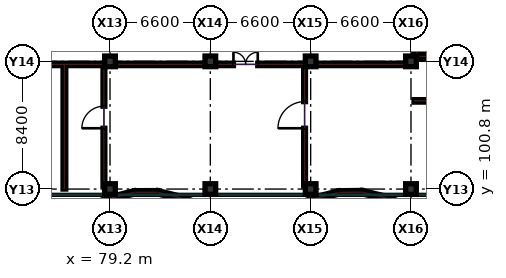
"""IFC4 building model, lengths in metres.
Left out: names, types, materials, properties, quantities, classifications, styles, units other than length and angle.
Written with IfcOpenShell. Run it as: python <this file> out.ifc"""

import sys

from ifc_helpers import new_model, si_unit, direction, frame, frame_2d, origin, origin_2d, place, context, subcontext, project, spatial, rectangle, extrude, element, fill, save


model = new_model("IFC4")
c1 = context("Model", 3, precision=1e-05, world=origin(), true_north=direction((0.0, 1.0)))
c2 = subcontext(c1, "Body", "Model", "MODEL_VIEW")
j1 = project(units=[si_unit("LENGTHUNIT", "METRE"), si_unit("PLANEANGLEUNIT", "RADIAN")], contexts=[c1])
p1 = place(None, origin())
s1 = spatial("IfcSite", under=j1, at=p1, CompositionType="ELEMENT")
p2 = place(p1, origin())
s2 = spatial("IfcBuilding", under=s1, at=p2, CompositionType="ELEMENT")
p3 = place(p2, frame((0.0, 0.0, 5.4)))
s3 = spatial("IfcBuildingStorey", under=s2, at=p3, CompositionType="ELEMENT", Elevation=5.4)
for number, where, z_axis, x_axis in (
    (1, (79.2, 100.8, 0.0), (0.0, 0.0, 1.0), (1.0, 0.0, 0.0)),
    (2, (79.2, 109.2, 0.0), (0.0, 0.0, 1.0), (1.0, 0.0, 0.0)),
    (3, (85.8, 100.8, 0.0), (0.0, 0.0, 1.0), (1.0, 0.0, 0.0)),
    (4, (85.8, 109.2, 0.0), (0.0, 0.0, 1.0), (1.0, 0.0, 0.0)),
    (5, (92.4, 100.8, 0.0), (0.0, 0.0, 1.0), (1.0, 0.0, 0.0)),
    (6, (92.4, 109.2, 0.0), (0.0, 0.0, 1.0), (1.0, 0.0, 0.0)),
    (7, (99.0, 100.8, 0.0), (0.0, 0.0, 1.0), (1.0, 0.0, 0.0)),
    (8, (99.0, 109.2, 0.0), (0.0, 0.0, 1.0), (1.0, 0.0, 0.0)),
):
    element("IfcColumn", number, at=place(p3, frame(where, z_axis=z_axis, x_axis=x_axis)), inside=s3, PredefinedType="COLUMN", context=c2, shape_type="SweptSolid", body=[
        extrude(rectangle(XDim=0.7, YDim=0.7, at=origin_2d()), origin(), (0.0, 0.0, 1.0), 4.5),
    ])
p4 = place(p3, frame((73.05, 109.0, 0.0), z_axis=(0.0, 0.0, 1.0), x_axis=(1.0, 0.0, 0.0)))
e9 = element("IfcWall", 9, at=p4, inside=s3, PredefinedType="PARTITIONING", context=c2, shape_type="SweptSolid", body=[
    extrude(rectangle(XDim=5.7, YDim=0.16, at=frame_2d((2.85, 0.0))), origin(), (0.0, 0.0, 1.0), 3.435),
])
p5 = place(p3, frame((79.65, 109.0, 0.0), z_axis=(0.0, 0.0, 1.0), x_axis=(1.0, 0.0, 0.0)))
e10 = element("IfcWall", 10, at=p5, inside=s3, PredefinedType="PARTITIONING", context=c2, shape_type="SweptSolid", body=[
    extrude(rectangle(XDim=5.7, YDim=0.16, at=frame_2d((2.85, 0.0))), origin(), (0.0, 0.0, 1.0), 3.435),
])
p6 = place(p3, frame((86.25, 109.0, 0.0), z_axis=(0.0, 0.0, 1.0), x_axis=(1.0, 0.0, 0.0)))
e11 = element("IfcWall", 11, at=p6, inside=s3, PredefinedType="PARTITIONING", context=c2, shape_type="SweptSolid", body=[
    extrude(rectangle(XDim=5.7, YDim=0.16, at=frame_2d((2.85, 0.0))), origin(), (0.0, 0.0, 1.0), 3.435),
])
p7 = place(p6, frame((1.07, 0.0, 0.0)))
e12 = element("IfcOpeningElement", 12, at=p7, cuts=e11, PredefinedType="OPENING", context=c2, shape_type="SweptSolid", body=[
    extrude(rectangle(XDim=1.6, YDim=2.2, at=frame_2d((0.8, 1.1))), frame((0.0, 0.09, 0.0), z_axis=(0.0, -1.0, 0.0), x_axis=(1.0, 0.0, 0.0)), (0.0, 0.0, 1.0), 0.18),
])
p8 = place(p3, frame((92.85, 109.0, 0.0), z_axis=(0.0, 0.0, 1.0), x_axis=(1.0, 0.0, 0.0)))
e13 = element("IfcWall", 13, at=p8, inside=s3, PredefinedType="PARTITIONING", context=c2, shape_type="SweptSolid", body=[
    extrude(rectangle(XDim=6.45, YDim=0.16, at=frame_2d((3.225, 0.0))), origin(), (0.0, 0.0, 1.0), 3.435),
])
p9 = place(p3, frame((76.2, 100.8, 0.0), z_axis=(0.0, 0.0, 1.0), x_axis=(0.0, 1.0, 0.0)))
e14 = element("IfcWall", 14, at=p9, inside=s3, PredefinedType="SOLIDWALL", context=c2, shape_type="SweptSolid", body=[
    extrude(rectangle(XDim=8.2, YDim=0.18, at=frame_2d((4.1, 0.0))), origin(), (0.0, 0.0, 1.0), 3.45),
])
p10 = place(p3, frame((78.8, 101.0, 0.0), z_axis=(0.0, 0.0, 1.0), x_axis=(0.0, 1.0, 0.0)))
e15 = element("IfcWall", 15, at=p10, inside=s3, PredefinedType="PARTITIONING", context=c2, shape_type="SweptSolid", body=[
    extrude(rectangle(XDim=8.0, YDim=0.12, at=frame_2d((4.0, 0.0))), origin(), (0.0, 0.0, 1.0), 3.45),
])
p11 = place(p10, frame((3.8, 0.0, 0.0)))
e16 = element("IfcOpeningElement", 16, at=p11, cuts=e15, PredefinedType="OPENING", context=c2, shape_type="SweptSolid", body=[
    extrude(rectangle(XDim=1.45, YDim=2.25, at=frame_2d((0.725, 1.125))), frame((0.0, 0.07, 0.0), z_axis=(0.0, -1.0, 0.0), x_axis=(1.0, 0.0, 0.0)), (0.0, 0.0, 1.0), 0.14),
])
p12 = place(p3, frame((92.0, 101.0, 0.0), z_axis=(0.0, 0.0, 1.0), x_axis=(0.0, 1.0, 0.0)))
e17 = element("IfcWall", 17, at=p12, inside=s3, PredefinedType="PARTITIONING", context=c2, shape_type="SweptSolid", body=[
    extrude(rectangle(XDim=8.0, YDim=0.12, at=frame_2d((4.0, 0.0))), origin(), (0.0, 0.0, 1.0), 3.45),
])
p13 = place(p12, frame((3.8, 0.0, 0.0)))
e18 = element("IfcOpeningElement", 18, at=p13, cuts=e17, PredefinedType="OPENING", context=c2, shape_type="SweptSolid", body=[
    extrude(rectangle(XDim=1.75, YDim=2.3, at=frame_2d((0.875, 1.15))), frame((0.0, 0.07, 0.0), z_axis=(0.0, -1.0, 0.0), x_axis=(1.0, 0.0, 0.0)), (0.0, 0.0, 1.0), 0.14),
])
p14 = place(p3, frame((99.2, 106.6, 0.0), z_axis=(0.0, 0.0, 1.0), x_axis=(1.0, 0.0, 0.0)))
e19 = element("IfcWall", 19, at=p14, inside=s3, PredefinedType="PARTITIONING", context=c2, shape_type="SweptSolid", body=[
    extrude(rectangle(XDim=12.9, YDim=0.16, at=frame_2d((6.45, 0.0))), origin(), (0.0, 0.0, 1.0), 3.45),
])
p15 = place(p14, frame((4.2, 0.0, 0.0)))
e20 = element("IfcOpeningElement", 20, at=p15, cuts=e19, PredefinedType="OPENING", context=c2, shape_type="SweptSolid", body=[
    extrude(rectangle(XDim=1.05, YDim=2.15, at=frame_2d((0.525, 1.075))), frame((0.0, 0.09, 0.0), z_axis=(0.0, -1.0, 0.0), x_axis=(1.0, 0.0, 0.0)), (0.0, 0.0, 1.0), 0.18),
])
p16 = place(p3, frame((77.78, 99.63, 0.0), z_axis=(0.0, 0.0, 1.0), x_axis=(0.93436439089, 0.356318937241, 0.0)))
e21 = element("IfcWall", 21, at=p16, inside=s3, PredefinedType="SOLIDWALL", context=c2, shape_type="SweptSolid", body=[
    extrude(rectangle(XDim=1.6, YDim=0.22, at=frame_2d((0.8, 0.0))), origin(), (0.0, 0.0, 1.0), 1.45),
])
p17 = place(p3, frame((79.29, 100.205, 0.0), z_axis=(0.0, 0.0, 1.0), x_axis=(0.969946501023, 0.243318279531, 0.0)))
e22 = element("IfcWall", 22, at=p17, inside=s3, PredefinedType="SOLIDWALL", context=c2, shape_type="SweptSolid", body=[
    extrude(rectangle(XDim=1.541, YDim=0.22, at=frame_2d((0.771, 0.0))), origin(), (0.0, 0.0, 1.0), 1.45),
])
p18 = place(p3, frame((80.82, 100.585, 0.0), z_axis=(0.0, 0.0, 1.0), x_axis=(0.999994118661, 0.003429671157, 0.0)))
e23 = element("IfcWall", 23, at=p18, inside=s3, PredefinedType="SOLIDWALL", context=c2, shape_type="SweptSolid", body=[
    extrude(rectangle(XDim=1.495, YDim=0.22, at=frame_2d((0.748, 0.0))), origin(), (0.0, 0.0, 1.0), 1.45),
])
p19 = place(p3, frame((82.35, 100.585, 0.0), z_axis=(0.0, 0.0, 1.0), x_axis=(0.971462405428, -0.237193580943, 0.0)))
e24 = element("IfcWall", 24, at=p19, inside=s3, PredefinedType="SOLIDWALL", context=c2, shape_type="SweptSolid", body=[
    extrude(rectangle(XDim=1.539, YDim=0.22, at=frame_2d((0.77, 0.0))), origin(), (0.0, 0.0, 1.0), 1.45),
])
p20 = place(p3, frame((83.86, 100.215, 0.0), z_axis=(0.0, 0.0, 1.0), x_axis=(0.933975237915, -0.35733773235, 0.0)))
e25 = element("IfcWall", 25, at=p20, inside=s3, PredefinedType="SOLIDWALL", context=c2, shape_type="SweptSolid", body=[
    extrude(rectangle(XDim=1.595, YDim=0.22, at=frame_2d((0.798, 0.0))), origin(), (0.0, 0.0, 1.0), 1.45),
])
p21 = place(p3, frame((91.23, 99.61, 0.0), z_axis=(0.0, 0.0, 1.0), x_axis=(0.933365245405, 0.358928013215, 0.0)))
e26 = element("IfcWall", 26, at=p21, inside=s3, PredefinedType="SOLIDWALL", context=c2, shape_type="SweptSolid", body=[
    extrude(rectangle(XDim=1.602, YDim=0.22, at=frame_2d((0.801, 0.0))), origin(), (0.0, 0.0, 1.0), 1.45),
])
p22 = place(p3, frame((92.74, 100.19, 0.0), z_axis=(0.0, 0.0, 1.0), x_axis=(0.968406785453, 0.249375816567, 0.0)))
e27 = element("IfcWall", 27, at=p22, inside=s3, PredefinedType="SOLIDWALL", context=c2, shape_type="SweptSolid", body=[
    extrude(rectangle(XDim=1.544, YDim=0.22, at=frame_2d((0.772, 0.0))), origin(), (0.0, 0.0, 1.0), 1.45),
])
p23 = place(p3, frame((94.27, 100.58, 0.0), z_axis=(0.0, 0.0, 1.0), x_axis=(0.999909748969, 0.01343480246, 0.0)))
e28 = element("IfcWall", 28, at=p23, inside=s3, PredefinedType="SOLIDWALL", context=c2, shape_type="SweptSolid", body=[
    extrude(rectangle(XDim=1.49, YDim=0.22, at=frame_2d((0.745, 0.0))), origin(), (0.0, 0.0, 1.0), 1.45),
])
p24 = place(p3, frame((95.795, 100.595, 0.0), z_axis=(0.0, 0.0, 1.0), x_axis=(0.972234340088, -0.234009375782, 0.0)))
e29 = element("IfcWall", 29, at=p24, inside=s3, PredefinedType="SOLIDWALL", context=c2, shape_type="SweptSolid", body=[
    extrude(rectangle(XDim=1.538, YDim=0.22, at=frame_2d((0.769, 0.0))), origin(), (0.0, 0.0, 1.0), 1.45),
])
p25 = place(p3, frame((97.305, 100.23, 0.0), z_axis=(0.0, 0.0, 1.0), x_axis=(0.935447403013, -0.353465919427, 0.0)))
e30 = element("IfcWall", 30, at=p25, inside=s3, PredefinedType="SOLIDWALL", context=c2, shape_type="SweptSolid", body=[
    extrude(rectangle(XDim=1.598, YDim=0.22, at=frame_2d((0.799, 0.0))), origin(), (0.0, 0.0, 1.0), 1.45),
])
p26 = place(p3, frame((99.37, 109.34, 0.0), z_axis=(0.0, 0.0, 1.0), x_axis=(0.0, 1.0, 0.0)))
e31 = element("IfcWall", 31, at=p26, inside=s3, PredefinedType="SHEAR", context=c2, shape_type="SweptSolid", body=[
    extrude(rectangle(XDim=8.09, YDim=0.36, at=frame_2d((4.045, 0.0))), origin(), (0.0, 0.0, 1.0), 4.2),
])
p27 = place(p3, frame((99.55, 109.52, 0.0), z_axis=(0.0, 0.0, 1.0), x_axis=(1.0, 0.0, 0.0)))
e32 = element("IfcWall", 32, at=p27, inside=s3, PredefinedType="SHEAR", context=c2, shape_type="SweptSolid", body=[
    extrude(rectangle(XDim=3.8, YDim=0.36, at=frame_2d((1.9, 0.0))), origin(), (0.0, 0.0, 1.0), 4.2),
])
p28 = place(p7, origin())
e33 = element("IfcDoor", 33, at=p28, inside=s3, OperationType="DOUBLE_DOOR_SINGLE_SWING", PredefinedType="DOOR", context=c2, shape_type="SweptSolid", body=[
    extrude(rectangle(XDim=1.6, YDim=2.2, at=frame_2d((0.8, 1.1))), frame((0.0, 0.025, 0.0), z_axis=(0.0, -1.0, 0.0), x_axis=(1.0, 0.0, 0.0)), (0.0, 0.0, 1.0), 0.05),
])
fill(e12, e33)
p29 = place(p11, origin())
e34 = element("IfcDoor", 34, at=p29, inside=s3, OperationType="SINGLE_SWING_LEFT", PredefinedType="DOOR", context=c2, shape_type="SweptSolid", body=[
    extrude(rectangle(XDim=1.45, YDim=2.25, at=frame_2d((0.725, 1.125))), frame((0.0, 0.025, 0.0), z_axis=(0.0, -1.0, 0.0), x_axis=(1.0, 0.0, 0.0)), (0.0, 0.0, 1.0), 0.05),
])
fill(e16, e34)
p30 = place(p13, origin())
e35 = element("IfcDoor", 35, at=p30, inside=s3, OperationType="SINGLE_SWING_LEFT", PredefinedType="DOOR", context=c2, shape_type="SweptSolid", body=[
    extrude(rectangle(XDim=1.75, YDim=2.3, at=frame_2d((0.875, 1.15))), frame((0.0, 0.025, 0.0), z_axis=(0.0, -1.0, 0.0), x_axis=(1.0, 0.0, 0.0)), (0.0, 0.0, 1.0), 0.05),
])
fill(e18, e35)
save(model, sys.argv[1])
